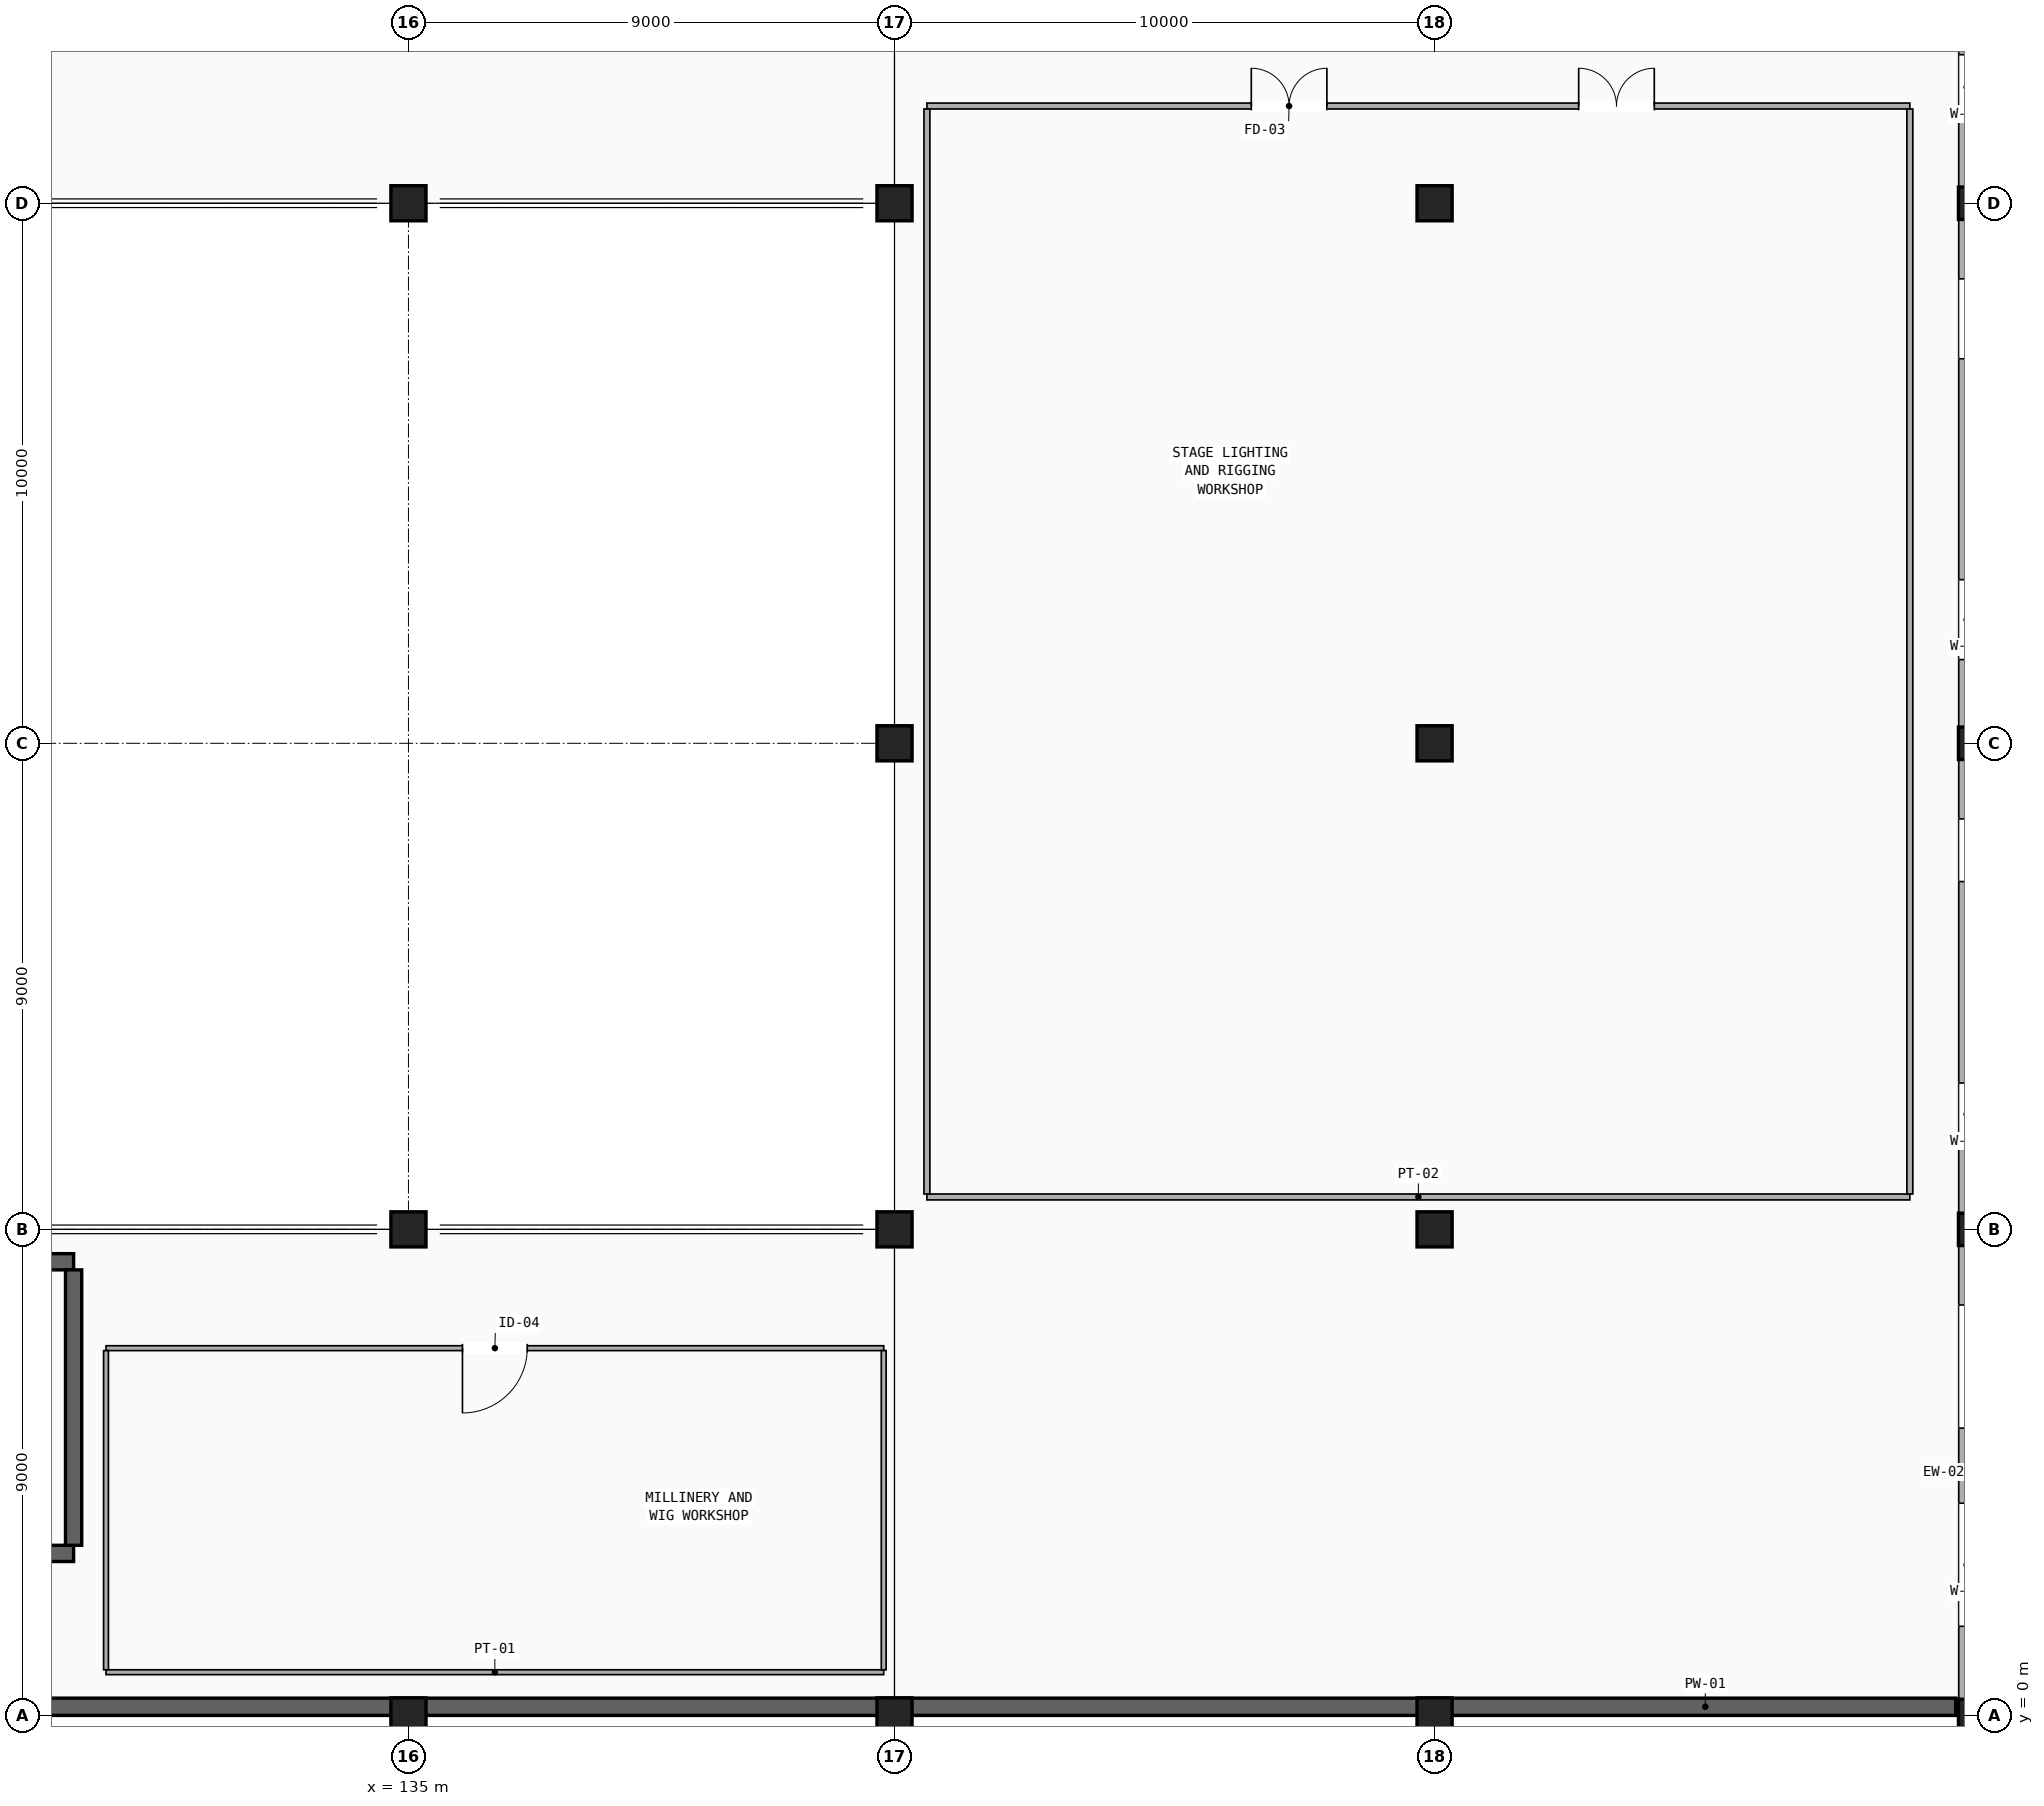
"""IFC4 building model, lengths in metres.
Left out: names, types, materials, properties, quantities, classifications, styles, units other than length and angle.
Written with IfcOpenShell. Run it as: python <this file> out.ifc"""

import sys

from ifc_helpers import new_model, si_unit, direction, frame, frame_2d, origin, origin_2d, place, context, subcontext, project, spatial, rectangle, extrude, element, fill, save


model = new_model("IFC4")
c1 = context("Model", 3, precision=1e-05, world=origin(), true_north=direction((0.0, 1.0)))
c2 = subcontext(c1, "Body", "Model", "MODEL_VIEW")
j1 = project(units=[si_unit("LENGTHUNIT", "METRE"), si_unit("PLANEANGLEUNIT", "RADIAN")], contexts=[c1])
p1 = place(None, origin())
s1 = spatial("IfcSite", under=j1, at=p1, CompositionType="ELEMENT")
p2 = place(p1, origin())
s2 = spatial("IfcBuilding", under=s1, at=p2, CompositionType="ELEMENT")
p3 = place(p2, frame((0.0, 0.0, 5.1)))
s3 = spatial("IfcBuildingStorey", under=s2, at=p3, CompositionType="ELEMENT", Elevation=5.1)
for number, where, z_axis, x_axis in (
    (1, (135.0, 0.0, 0.0), (0.0, 0.0, 1.0), (1.0, 0.0, 0.0)),
    (2, (135.0, 9.0, 0.0), (0.0, 0.0, 1.0), (1.0, 0.0, 0.0)),
    (3, (135.0, 28.0, 0.0), (0.0, 0.0, 1.0), (1.0, 0.0, 0.0)),
    (4, (144.0, 0.0, 0.0), (0.0, 0.0, 1.0), (1.0, 0.0, 0.0)),
    (5, (144.0, 9.0, 0.0), (0.0, 0.0, 1.0), (1.0, 0.0, 0.0)),
    (6, (144.0, 18.0, 0.0), (0.0, 0.0, 1.0), (1.0, 0.0, 0.0)),
    (7, (144.0, 28.0, 0.0), (0.0, 0.0, 1.0), (1.0, 0.0, 0.0)),
    (8, (154.0, 0.0, 0.0), (0.0, 0.0, 1.0), (1.0, 0.0, 0.0)),
    (9, (154.0, 9.0, 0.0), (0.0, 0.0, 1.0), (1.0, 0.0, 0.0)),
    (10, (154.0, 18.0, 0.0), (0.0, 0.0, 1.0), (1.0, 0.0, 0.0)),
    (11, (154.0, 28.0, 0.0), (0.0, 0.0, 1.0), (1.0, 0.0, 0.0)),
):
    element("IfcColumn", number, at=place(p3, frame(where, z_axis=z_axis, x_axis=x_axis)), inside=s3, PredefinedType="COLUMN", context=c2, shape_type="SweptSolid", body=[
        extrude(rectangle(XDim=0.65, YDim=0.65, at=origin_2d()), origin(), (0.0, 0.0, 1.0), 4.42),
    ])
for number, where, z_axis, x_axis in (
    (12, (164.0, 0.0, 0.0), (0.0, 0.0, 1.0), (1.0, 0.0, 0.0)),
    (13, (164.0, 9.0, 0.0), (0.0, 0.0, 1.0), (1.0, 0.0, 0.0)),
    (14, (164.0, 18.0, 0.0), (0.0, 0.0, 1.0), (1.0, 0.0, 0.0)),
    (15, (164.0, 28.0, 0.0), (0.0, 0.0, 1.0), (1.0, 0.0, 0.0)),
):
    element("IfcColumn", number, at=place(p3, frame(where, z_axis=z_axis, x_axis=x_axis)), inside=s3, PredefinedType="COLUMN", context=c2, shape_type="SweptSolid", body=[
        extrude(rectangle(XDim=0.6, YDim=0.6, at=origin_2d()), origin(), (0.0, 0.0, 1.0), 4.42),
    ])
for number, where, z_axis, x_axis in (
    (16, (118.5, 3.0, 0.0), (0.0, 0.0, 1.0), (1.0, 0.0, 0.0)),
    (17, (118.5, 8.4, 0.0), (0.0, 0.0, 1.0), (1.0, 0.0, 0.0)),
):
    element("IfcWall", number, at=place(p3, frame(where, z_axis=z_axis, x_axis=x_axis)), inside=s3, PredefinedType="SHEAR", context=c2, shape_type="SweptSolid", body=[
        extrude(rectangle(XDim=10.3, YDim=0.3, at=frame_2d((5.15, 0.0))), origin(), (0.0, 0.0, 1.0), 4.42),
    ])
p4 = place(p3, frame((128.8, 3.15, 0.0), z_axis=(0.0, 0.0, 1.0), x_axis=(0.0, 1.0, 0.0)))
e18 = element("IfcWall", 18, at=p4, inside=s3, PredefinedType="SHEAR", context=c2, shape_type="SweptSolid", body=[
    extrude(rectangle(XDim=5.1, YDim=0.3, at=frame_2d((2.55, 0.0))), origin(), (0.0, 0.0, 1.0), 4.42),
])
p5 = place(p3, frame((73.775, 0.16, 0.0), z_axis=(0.0, 0.0, 1.0), x_axis=(1.0, 0.0, 0.0)))
e19 = element("IfcWall", 19, at=p5, inside=s3, PredefinedType="SHEAR", context=c2, shape_type="SweptSolid", body=[
    extrude(rectangle(XDim=89.875, YDim=0.32, at=frame_2d((44.938, 0.0))), origin(), (0.0, 0.0, 1.0), 4.42),
])
p6 = place(p3, frame((163.85, 0.3, 0.0), z_axis=(0.0, 0.0, 1.0), x_axis=(0.0, 1.0, 0.0)))
e20 = element("IfcWall", 20, at=p6, inside=s3, PredefinedType="STANDARD", context=c2, shape_type="SweptSolid", body=[
    extrude(rectangle(XDim=8.4, YDim=0.29, at=frame_2d((4.2, 0.0))), origin(), (0.0, 0.0, 1.0), 3.617),
])
p7 = place(p6, frame((1.35, 0.0, 0.9)))
e21 = element("IfcOpeningElement", 21, at=p7, cuts=e20, PredefinedType="OPENING", context=c2, shape_type="SweptSolid", body=[
    extrude(rectangle(XDim=2.28, YDim=1.72, at=frame_2d((1.14, 0.86))), frame((0.0, 0.155, 0.0), z_axis=(0.0, -1.0, 0.0), x_axis=(1.0, 0.0, 0.0)), (0.0, 0.0, 1.0), 0.31),
])
p8 = place(p6, frame((5.02, 0.0, 0.9)))
e22 = element("IfcOpeningElement", 22, at=p8, cuts=e20, PredefinedType="OPENING", context=c2, shape_type="SweptSolid", body=[
    extrude(rectangle(XDim=2.28, YDim=1.72, at=frame_2d((1.14, 0.86))), frame((0.0, 0.155, 0.0), z_axis=(0.0, -1.0, 0.0), x_axis=(1.0, 0.0, 0.0)), (0.0, 0.0, 1.0), 0.31),
])
p9 = place(p3, frame((163.85, 9.3, 0.0), z_axis=(0.0, 0.0, 1.0), x_axis=(0.0, 1.0, 0.0)))
e23 = element("IfcWall", 23, at=p9, inside=s3, PredefinedType="STANDARD", context=c2, shape_type="SweptSolid", body=[
    extrude(rectangle(XDim=8.4, YDim=0.29, at=frame_2d((4.2, 0.0))), origin(), (0.0, 0.0, 1.0), 3.617),
])
p10 = place(p9, frame((1.25, 0.0, 0.9)))
e24 = element("IfcOpeningElement", 24, at=p10, cuts=e23, PredefinedType="OPENING", context=c2, shape_type="SweptSolid", body=[
    extrude(rectangle(XDim=1.16, YDim=1.9, at=frame_2d((0.58, 0.95))), frame((0.0, 0.155, 0.0), z_axis=(0.0, -1.0, 0.0), x_axis=(1.0, 0.0, 0.0)), (0.0, 0.0, 1.0), 0.31),
])
p11 = place(p9, frame((6.14, 0.0, 0.9)))
e25 = element("IfcOpeningElement", 25, at=p11, cuts=e23, PredefinedType="OPENING", context=c2, shape_type="SweptSolid", body=[
    extrude(rectangle(XDim=1.16, YDim=1.9, at=frame_2d((0.58, 0.95))), frame((0.0, 0.155, 0.0), z_axis=(0.0, -1.0, 0.0), x_axis=(1.0, 0.0, 0.0)), (0.0, 0.0, 1.0), 0.31),
])
p12 = place(p3, frame((163.85, 18.3, 0.0), z_axis=(0.0, 0.0, 1.0), x_axis=(0.0, 1.0, 0.0)))
e26 = element("IfcWall", 26, at=p12, inside=s3, PredefinedType="STANDARD", context=c2, shape_type="SweptSolid", body=[
    extrude(rectangle(XDim=9.4, YDim=0.29, at=frame_2d((4.7, 0.0))), origin(), (0.0, 0.0, 1.0), 3.617),
])
p13 = place(p12, frame((1.25, 0.0, 0.9)))
e27 = element("IfcOpeningElement", 27, at=p13, cuts=e26, PredefinedType="OPENING", context=c2, shape_type="SweptSolid", body=[
    extrude(rectangle(XDim=1.48, YDim=1.9, at=frame_2d((0.74, 0.95))), frame((0.0, 0.155, 0.0), z_axis=(0.0, -1.0, 0.0), x_axis=(1.0, 0.0, 0.0)), (0.0, 0.0, 1.0), 0.31),
])
p14 = place(p12, frame((6.82, 0.0, 0.9)))
e28 = element("IfcOpeningElement", 28, at=p14, cuts=e26, PredefinedType="OPENING", context=c2, shape_type="SweptSolid", body=[
    extrude(rectangle(XDim=1.48, YDim=1.9, at=frame_2d((0.74, 0.95))), frame((0.0, 0.155, 0.0), z_axis=(0.0, -1.0, 0.0), x_axis=(1.0, 0.0, 0.0)), (0.0, 0.0, 1.0), 0.31),
])
p15 = place(p3, frame((163.85, 28.3, 0.0), z_axis=(0.0, 0.0, 1.0), x_axis=(0.0, 1.0, 0.0)))
e29 = element("IfcWall", 29, at=p15, inside=s3, PredefinedType="STANDARD", context=c2, shape_type="SweptSolid", body=[
    extrude(rectangle(XDim=8.4, YDim=0.29, at=frame_2d((4.2, 0.0))), origin(), (0.0, 0.0, 1.0), 3.617),
])
p16 = place(p15, frame((1.25, 0.0, 0.9)))
e30 = element("IfcOpeningElement", 30, at=p16, cuts=e29, PredefinedType="OPENING", context=c2, shape_type="SweptSolid", body=[
    extrude(rectangle(XDim=1.2, YDim=2.1, at=frame_2d((0.6, 1.05))), frame((0.0, 0.155, 0.0), z_axis=(0.0, -1.0, 0.0), x_axis=(1.0, 0.0, 0.0)), (0.0, 0.0, 1.0), 0.31),
])
p17 = place(p15, frame((6.1, 0.0, 0.9)))
e31 = element("IfcOpeningElement", 31, at=p17, cuts=e29, PredefinedType="OPENING", context=c2, shape_type="SweptSolid", body=[
    extrude(rectangle(XDim=1.2, YDim=2.1, at=frame_2d((0.6, 1.05))), frame((0.0, 0.155, 0.0), z_axis=(0.0, -1.0, 0.0), x_axis=(1.0, 0.0, 0.0)), (0.0, 0.0, 1.0), 0.31),
])
p18 = place(p3, frame((129.4, 0.8, 0.0), z_axis=(0.0, 0.0, 1.0), x_axis=(1.0, 0.0, 0.0)))
e32 = element("IfcWall", 32, at=p18, inside=s3, PredefinedType="PARTITIONING", context=c2, shape_type="SweptSolid", body=[
    extrude(rectangle(XDim=14.4, YDim=0.09, at=frame_2d((7.2, 0.0))), origin(), (0.0, 0.0, 1.0), 3.29),
])
p19 = place(p3, frame((129.4, 6.8, 0.0), z_axis=(0.0, 0.0, 1.0), x_axis=(1.0, 0.0, 0.0)))
e33 = element("IfcWall", 33, at=p19, inside=s3, PredefinedType="PARTITIONING", context=c2, shape_type="SweptSolid", body=[
    extrude(rectangle(XDim=14.4, YDim=0.09, at=frame_2d((7.2, 0.0))), origin(), (0.0, 0.0, 1.0), 3.29),
])
p20 = place(p19, frame((6.6, 0.0, 0.0)))
e34 = element("IfcOpeningElement", 34, at=p20, cuts=e33, PredefinedType="OPENING", context=c2, shape_type="SweptSolid", body=[
    extrude(rectangle(XDim=1.2, YDim=2.2, at=frame_2d((0.6, 1.1))), frame((0.0, 0.055, 0.0), z_axis=(0.0, -1.0, 0.0), x_axis=(1.0, 0.0, 0.0)), (0.0, 0.0, 1.0), 0.11),
])
p21 = place(p3, frame((129.4, 0.845, 0.0), z_axis=(0.0, 0.0, 1.0), x_axis=(0.0, 1.0, 0.0)))
e35 = element("IfcWall", 35, at=p21, inside=s3, PredefinedType="PARTITIONING", context=c2, shape_type="SweptSolid", body=[
    extrude(rectangle(XDim=5.91, YDim=0.09, at=frame_2d((2.955, 0.0))), origin(), (0.0, 0.0, 1.0), 4.16),
])
p22 = place(p3, frame((143.8, 0.845, 0.0), z_axis=(0.0, 0.0, 1.0), x_axis=(0.0, 1.0, 0.0)))
e36 = element("IfcWall", 36, at=p22, inside=s3, PredefinedType="PARTITIONING", context=c2, shape_type="SweptSolid", body=[
    extrude(rectangle(XDim=5.91, YDim=0.09, at=frame_2d((2.955, 0.0))), origin(), (0.0, 0.0, 1.0), 3.29),
])
p23 = place(p3, frame((144.6, 9.6, 0.0), z_axis=(0.0, 0.0, 1.0), x_axis=(1.0, 0.0, 0.0)))
e37 = element("IfcWall", 37, at=p23, inside=s3, PredefinedType="PARTITIONING", context=c2, shape_type="SweptSolid", body=[
    extrude(rectangle(XDim=18.2, YDim=0.11, at=frame_2d((9.1, 0.0))), origin(), (0.0, 0.0, 1.0), 3.44),
])
p24 = place(p3, frame((144.6, 29.8, 0.0), z_axis=(0.0, 0.0, 1.0), x_axis=(1.0, 0.0, 0.0)))
e38 = element("IfcWall", 38, at=p24, inside=s3, PredefinedType="PARTITIONING", context=c2, shape_type="SweptSolid", body=[
    extrude(rectangle(XDim=18.2, YDim=0.11, at=frame_2d((9.1, 0.0))), origin(), (0.0, 0.0, 1.0), 3.49),
])
p25 = place(p24, frame((6.006, 0.0, 0.0)))
e39 = element("IfcOpeningElement", 39, at=p25, cuts=e38, PredefinedType="OPENING", context=c2, shape_type="SweptSolid", body=[
    extrude(rectangle(XDim=1.4, YDim=2.2, at=frame_2d((0.7, 1.1))), frame((0.0, 0.065, 0.0), z_axis=(0.0, -1.0, 0.0), x_axis=(1.0, 0.0, 0.0)), (0.0, 0.0, 1.0), 0.13),
])
p26 = place(p24, frame((12.068, 0.0, 0.0)))
e40 = element("IfcOpeningElement", 40, at=p26, cuts=e38, PredefinedType="OPENING", context=c2, shape_type="SweptSolid", body=[
    extrude(rectangle(XDim=1.4, YDim=2.2, at=frame_2d((0.7, 1.1))), frame((0.0, 0.065, 0.0), z_axis=(0.0, -1.0, 0.0), x_axis=(1.0, 0.0, 0.0)), (0.0, 0.0, 1.0), 0.13),
])
p27 = place(p3, frame((144.6, 9.655, 0.0), z_axis=(0.0, 0.0, 1.0), x_axis=(0.0, 1.0, 0.0)))
e41 = element("IfcWall", 41, at=p27, inside=s3, PredefinedType="PARTITIONING", context=c2, shape_type="SweptSolid", body=[
    extrude(rectangle(XDim=20.09, YDim=0.11, at=frame_2d((10.045, 0.0))), origin(), (0.0, 0.0, 1.0), 3.24),
])
p28 = place(p3, frame((162.8, 9.655, 0.0), z_axis=(0.0, 0.0, 1.0), x_axis=(0.0, 1.0, 0.0)))
e42 = element("IfcWall", 42, at=p28, inside=s3, PredefinedType="PARTITIONING", context=c2, shape_type="SweptSolid", body=[
    extrude(rectangle(XDim=20.09, YDim=0.11, at=frame_2d((10.045, 0.0))), origin(), (0.0, 0.0, 1.0), 3.617),
])
p29 = place(p20, frame((1.2, 0.0, 0.0), z_axis=(0.0, 0.0, 1.0), x_axis=(-1.0, 0.0, 0.0)))
e43 = element("IfcDoor", 43, at=p29, inside=s3, OperationType="SINGLE_SWING_RIGHT", PredefinedType="DOOR", context=c2, shape_type="SweptSolid", body=[
    extrude(rectangle(XDim=1.2, YDim=2.2, at=frame_2d((0.6, 1.1))), frame((0.0, 0.025, 0.0), z_axis=(0.0, -1.0, 0.0), x_axis=(1.0, 0.0, 0.0)), (0.0, 0.0, 1.0), 0.05),
])
fill(e34, e43)
p30 = place(p25, origin())
e44 = element("IfcDoor", 44, at=p30, inside=s3, OperationType="DOUBLE_DOOR_SINGLE_SWING", PredefinedType="DOOR", context=c2, shape_type="SweptSolid", body=[
    extrude(rectangle(XDim=1.4, YDim=2.2, at=frame_2d((0.7, 1.1))), frame((0.0, 0.025, 0.0), z_axis=(0.0, -1.0, 0.0), x_axis=(1.0, 0.0, 0.0)), (0.0, 0.0, 1.0), 0.05),
])
fill(e39, e44)
p31 = place(p26, origin())
e45 = element("IfcDoor", 45, at=p31, inside=s3, OperationType="DOUBLE_DOOR_SINGLE_SWING", PredefinedType="DOOR", context=c2, shape_type="SweptSolid", body=[
    extrude(rectangle(XDim=1.4, YDim=2.2, at=frame_2d((0.7, 1.1))), frame((0.0, 0.025, 0.0), z_axis=(0.0, -1.0, 0.0), x_axis=(1.0, 0.0, 0.0)), (0.0, 0.0, 1.0), 0.05),
])
fill(e40, e45)
save(model, sys.argv[1])
